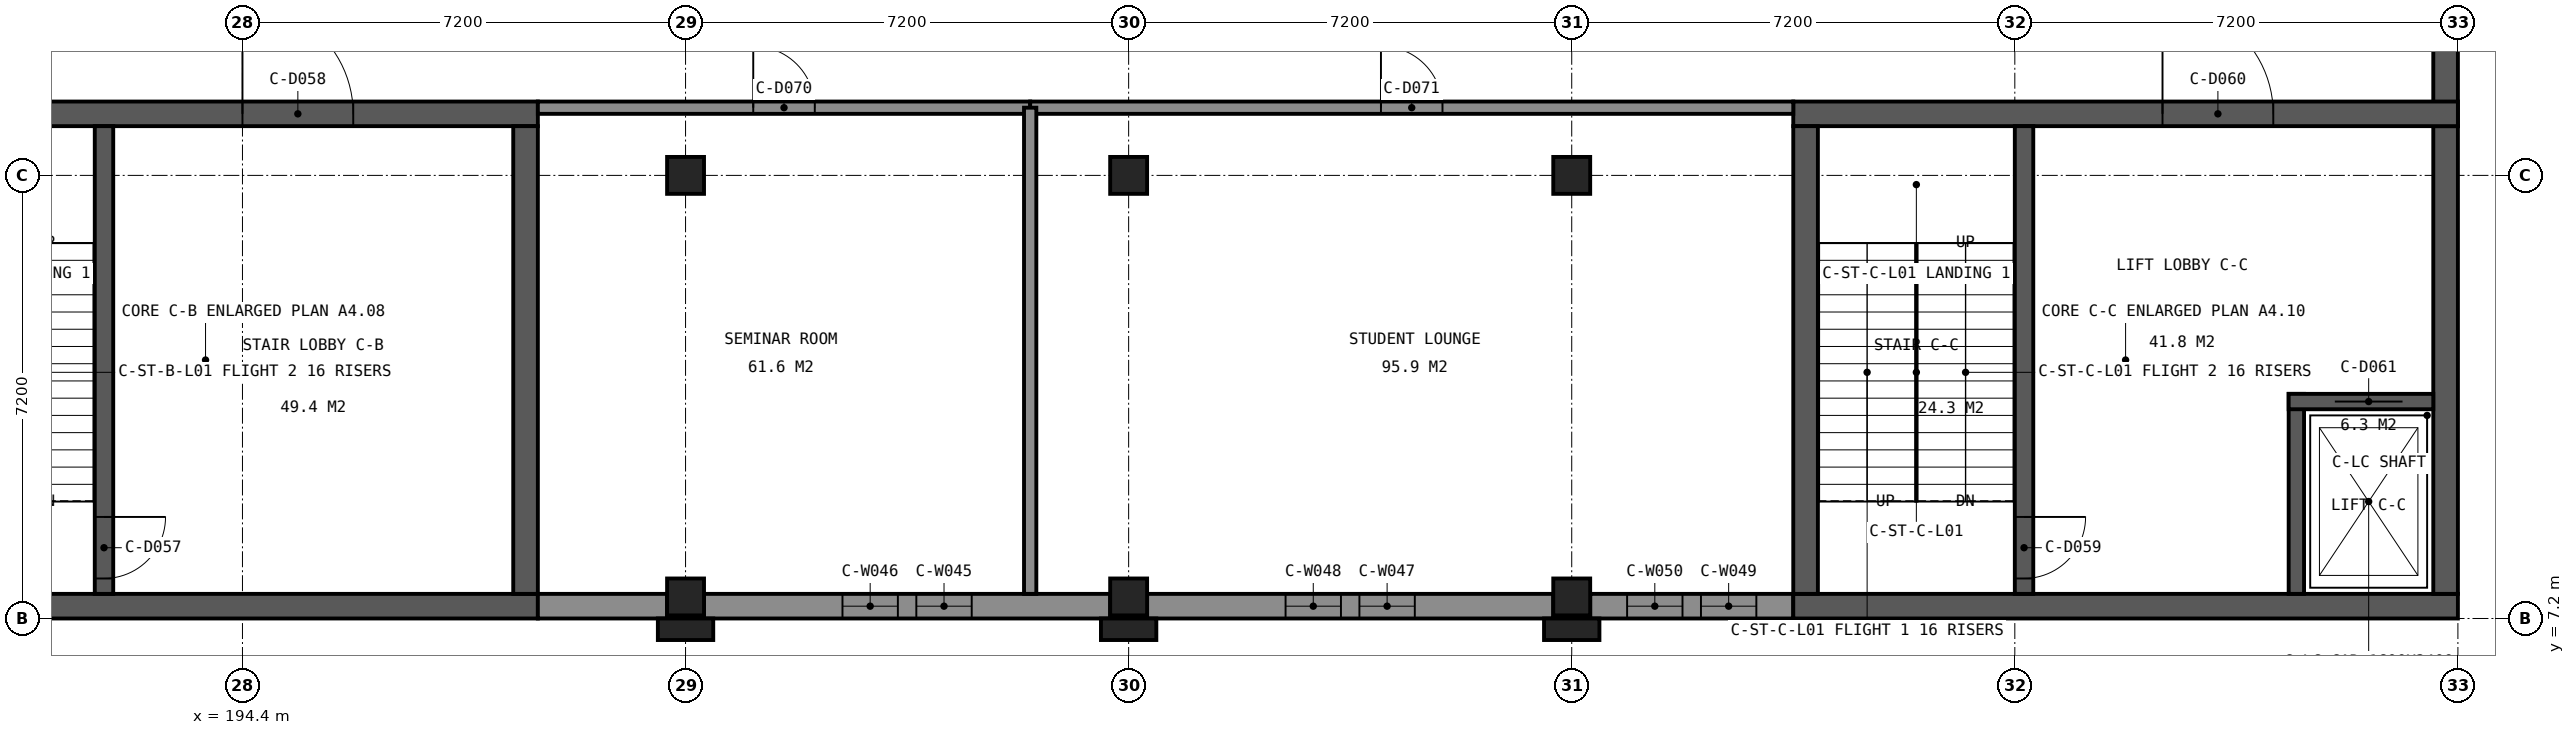
"""IFC4 building model, lengths in metres.
Left out: names, types, materials, properties, quantities, classifications, styles, units other than length and angle.
Written with IfcOpenShell. Run it as: python <this file> out.ifc"""

import sys

from ifc_helpers import new_model, si_unit, direction, frame, frame_2d, origin, origin_2d, place, context, subcontext, project, spatial, rectangle, extrude, element, fill, save


model = new_model("IFC4")
c1 = context("Model", 3, precision=1e-05, world=origin(), true_north=direction((0.0, 1.0)))
c2 = subcontext(c1, "Body", "Model", "MODEL_VIEW")
j1 = project(units=[si_unit("LENGTHUNIT", "METRE"), si_unit("PLANEANGLEUNIT", "RADIAN")], contexts=[c1])
p1 = place(None, origin())
s1 = spatial("IfcSite", under=j1, at=p1, CompositionType="ELEMENT")
p2 = place(p1, origin())
s2 = spatial("IfcBuilding", under=s1, at=p2, CompositionType="ELEMENT")
p3 = place(p2, frame((0.0, 0.0, 9.6)))
s3 = spatial("IfcBuildingStorey", under=s2, at=p3, CompositionType="ELEMENT", Elevation=9.6)
for number, where, z_axis, x_axis in (
    (1, (201.6, 14.4, 0.0), (0.0, 0.0, 1.0), (1.0, 0.0, 0.0)),
    (2, (208.8, 14.4, 0.0), (0.0, 0.0, 1.0), (1.0, 0.0, 0.0)),
    (3, (216.0, 14.4, 0.0), (0.0, 0.0, 1.0), (1.0, 0.0, 0.0)),
    (4, (201.6, 7.55, 0.0), (0.0, 0.0, 1.0), (1.0, 0.0, 0.0)),
    (5, (208.8, 7.55, 0.0), (0.0, 0.0, 1.0), (1.0, 0.0, 0.0)),
    (6, (216.0, 7.55, 0.0), (0.0, 0.0, 1.0), (1.0, 0.0, 0.0)),
):
    element("IfcColumn", number, at=place(p3, frame(where, z_axis=z_axis, x_axis=x_axis)), inside=s3, PredefinedType="COLUMN", context=c2, shape_type="SweptSolid", body=[
        extrude(rectangle(XDim=0.6, YDim=0.6, at=origin_2d()), origin(), (0.0, 0.0, 1.0), 4.8),
    ])
p4 = place(p3, frame((199.2, 7.4, 0.0), z_axis=(0.0, 0.0, 1.0), x_axis=(-1.0, 0.0, 0.0)))
e7 = element("IfcWall", 7, at=p4, inside=s3, PredefinedType="SHEAR", context=c2, shape_type="SweptSolid", body=[
    extrude(rectangle(XDim=10.8, YDim=0.4, at=frame_2d((5.4, 0.0))), origin(), (0.0, 0.0, 1.0), 4.55),
])
p5 = place(p3, frame((201.3, 7.4, 0.0), z_axis=(0.0, 0.0, 1.0), x_axis=(-1.0, 0.0, 0.0)))
e8 = element("IfcWall", 8, at=p5, inside=s3, PredefinedType="SOLIDWALL", context=c2, shape_type="SweptSolid", body=[
    extrude(rectangle(XDim=2.1, YDim=0.4, at=frame_2d((1.05, 0.0))), origin(), (0.0, 0.0, 1.0), 3.95),
])
p6 = place(p3, frame((208.5, 7.4, 0.0), z_axis=(0.0, 0.0, 1.0), x_axis=(-1.0, 0.0, 0.0)))
e9 = element("IfcWall", 9, at=p6, inside=s3, PredefinedType="SOLIDWALL", context=c2, shape_type="SweptSolid", body=[
    extrude(rectangle(XDim=6.6, YDim=0.4, at=frame_2d((3.3, 0.0))), origin(), (0.0, 0.0, 1.0), 3.95),
])
p7 = place(p6, frame((2.25, 0.0, 0.9)))
e10 = element("IfcOpeningElement", 10, at=p7, cuts=e9, PredefinedType="OPENING", context=c2, shape_type="SweptSolid", body=[
    extrude(rectangle(XDim=0.9, YDim=2.7, at=frame_2d((0.45, 1.35))), frame((0.0, 0.21, 0.0), z_axis=(0.0, -1.0, 0.0), x_axis=(1.0, 0.0, 0.0)), (0.0, 0.0, 1.0), 0.42),
])
p8 = place(p6, frame((3.45, 0.0, 0.9)))
e11 = element("IfcOpeningElement", 11, at=p8, cuts=e9, PredefinedType="OPENING", context=c2, shape_type="SweptSolid", body=[
    extrude(rectangle(XDim=0.9, YDim=2.7, at=frame_2d((0.45, 1.35))), frame((0.0, 0.21, 0.0), z_axis=(0.0, -1.0, 0.0), x_axis=(1.0, 0.0, 0.0)), (0.0, 0.0, 1.0), 0.42),
])
p9 = place(p3, frame((215.7, 7.4, 0.0), z_axis=(0.0, 0.0, 1.0), x_axis=(-1.0, 0.0, 0.0)))
e12 = element("IfcWall", 12, at=p9, inside=s3, PredefinedType="SOLIDWALL", context=c2, shape_type="SweptSolid", body=[
    extrude(rectangle(XDim=6.6, YDim=0.4, at=frame_2d((3.3, 0.0))), origin(), (0.0, 0.0, 1.0), 3.95),
])
p10 = place(p9, frame((2.25, 0.0, 0.9)))
e13 = element("IfcOpeningElement", 13, at=p10, cuts=e12, PredefinedType="OPENING", context=c2, shape_type="SweptSolid", body=[
    extrude(rectangle(XDim=0.9, YDim=2.7, at=frame_2d((0.45, 1.35))), frame((0.0, 0.21, 0.0), z_axis=(0.0, -1.0, 0.0), x_axis=(1.0, 0.0, 0.0)), (0.0, 0.0, 1.0), 0.42),
])
p11 = place(p9, frame((3.45, 0.0, 0.9)))
e14 = element("IfcOpeningElement", 14, at=p11, cuts=e12, PredefinedType="OPENING", context=c2, shape_type="SweptSolid", body=[
    extrude(rectangle(XDim=0.9, YDim=2.7, at=frame_2d((0.45, 1.35))), frame((0.0, 0.21, 0.0), z_axis=(0.0, -1.0, 0.0), x_axis=(1.0, 0.0, 0.0)), (0.0, 0.0, 1.0), 0.42),
])
p12 = place(p3, frame((219.6, 7.4, 0.0), z_axis=(0.0, 0.0, 1.0), x_axis=(-1.0, 0.0, 0.0)))
e15 = element("IfcWall", 15, at=p12, inside=s3, PredefinedType="SOLIDWALL", context=c2, shape_type="SweptSolid", body=[
    extrude(rectangle(XDim=3.3, YDim=0.4, at=frame_2d((1.65, 0.0))), origin(), (0.0, 0.0, 1.0), 3.95),
])
p13 = place(p12, frame((0.6, 0.0, 0.9)))
e16 = element("IfcOpeningElement", 16, at=p13, cuts=e15, PredefinedType="OPENING", context=c2, shape_type="SweptSolid", body=[
    extrude(rectangle(XDim=0.9, YDim=2.7, at=frame_2d((0.45, 1.35))), frame((0.0, 0.21, 0.0), z_axis=(0.0, -1.0, 0.0), x_axis=(1.0, 0.0, 0.0)), (0.0, 0.0, 1.0), 0.42),
])
p14 = place(p12, frame((1.8, 0.0, 0.9)))
e17 = element("IfcOpeningElement", 17, at=p14, cuts=e15, PredefinedType="OPENING", context=c2, shape_type="SweptSolid", body=[
    extrude(rectangle(XDim=0.9, YDim=2.7, at=frame_2d((0.45, 1.35))), frame((0.0, 0.21, 0.0), z_axis=(0.0, -1.0, 0.0), x_axis=(1.0, 0.0, 0.0)), (0.0, 0.0, 1.0), 0.42),
])
p15 = place(p3, frame((230.4, 7.4, 0.0), z_axis=(0.0, 0.0, 1.0), x_axis=(-1.0, 0.0, 0.0)))
e18 = element("IfcWall", 18, at=p15, inside=s3, PredefinedType="SHEAR", context=c2, shape_type="SweptSolid", body=[
    extrude(rectangle(XDim=10.8, YDim=0.4, at=frame_2d((5.4, 0.0))), origin(), (0.0, 0.0, 1.0), 4.55),
])
p16 = place(p3, frame((230.2, 21.3, 0.0), z_axis=(0.0, 0.0, 1.0), x_axis=(0.0, -1.0, 0.0)))
e19 = element("IfcWall", 19, at=p16, inside=s3, PredefinedType="SHEAR", context=c2, shape_type="SweptSolid", body=[
    extrude(rectangle(XDim=6.1, YDim=0.4, at=frame_2d((3.05, 0.0))), origin(), (0.0, 0.0, 1.0), 3.95),
])
p17 = place(p16, frame((3.2, 0.0, 0.9)))
e20 = element("IfcOpeningElement", 20, at=p17, cuts=e19, PredefinedType="OPENING", context=c2, shape_type="SweptSolid", body=[
    extrude(rectangle(XDim=0.9, YDim=2.7, at=frame_2d((0.45, 1.35))), frame((0.0, 0.21, 0.0), z_axis=(0.0, -1.0, 0.0), x_axis=(1.0, 0.0, 0.0)), (0.0, 0.0, 1.0), 0.42),
])
p18 = place(p3, frame((230.2, 15.2, 0.0), z_axis=(0.0, 0.0, 1.0), x_axis=(0.0, -1.0, 0.0)))
e21 = element("IfcWall", 21, at=p18, inside=s3, PredefinedType="SHEAR", context=c2, shape_type="SweptSolid", body=[
    extrude(rectangle(XDim=7.6, YDim=0.4, at=frame_2d((3.8, 0.0))), origin(), (0.0, 0.0, 1.0), 4.55),
])
p19 = place(p3, frame((188.4, 15.4, 0.0), z_axis=(0.0, 0.0, 1.0), x_axis=(1.0, 0.0, 0.0)))
e22 = element("IfcWall", 22, at=p19, inside=s3, PredefinedType="SHEAR", context=c2, shape_type="SweptSolid", body=[
    extrude(rectangle(XDim=10.8, YDim=0.4, at=frame_2d((5.4, 0.0))), origin(), (0.0, 0.0, 1.0), 4.55),
])
p20 = place(p19, frame((6.0, 0.0, 0.0)))
e23 = element("IfcOpeningElement", 23, at=p20, cuts=e22, PredefinedType="OPENING", context=c2, shape_type="SweptSolid", body=[
    extrude(rectangle(XDim=1.8, YDim=2.1, at=frame_2d((0.9, 1.05))), frame((0.0, 0.21, 0.0), z_axis=(0.0, -1.0, 0.0), x_axis=(1.0, 0.0, 0.0)), (0.0, 0.0, 1.0), 0.42),
])
p21 = place(p3, frame((199.0, 15.2, 0.0), z_axis=(0.0, 0.0, 1.0), x_axis=(0.0, -1.0, 0.0)))
e24 = element("IfcWall", 24, at=p21, inside=s3, PredefinedType="SHEAR", context=c2, shape_type="SweptSolid", body=[
    extrude(rectangle(XDim=7.6, YDim=0.4, at=frame_2d((3.8, 0.0))), origin(), (0.0, 0.0, 1.0), 4.55),
])
p22 = place(p3, frame((192.15, 15.2, 0.0), z_axis=(0.0, 0.0, 1.0), x_axis=(0.0, -1.0, 0.0)))
e25 = element("IfcWall", 25, at=p22, inside=s3, PredefinedType="SHEAR", context=c2, shape_type="SweptSolid", body=[
    extrude(rectangle(XDim=7.6, YDim=0.3, at=frame_2d((3.8, 0.0))), origin(), (0.0, 0.0, 1.0), 4.55),
])
p23 = place(p22, frame((6.35, 0.0, 0.0)))
e26 = element("IfcOpeningElement", 26, at=p23, cuts=e25, PredefinedType="OPENING", context=c2, shape_type="SweptSolid", body=[
    extrude(rectangle(XDim=1.0, YDim=2.1, at=frame_2d((0.5, 1.05))), frame((0.0, 0.16, 0.0), z_axis=(0.0, -1.0, 0.0), x_axis=(1.0, 0.0, 0.0)), (0.0, 0.0, 1.0), 0.32),
])
p24 = place(p3, frame((219.6, 15.4, 0.0), z_axis=(0.0, 0.0, 1.0), x_axis=(1.0, 0.0, 0.0)))
e27 = element("IfcWall", 27, at=p24, inside=s3, PredefinedType="SHEAR", context=c2, shape_type="SweptSolid", body=[
    extrude(rectangle(XDim=10.8, YDim=0.4, at=frame_2d((5.4, 0.0))), origin(), (0.0, 0.0, 1.0), 4.55),
])
p25 = place(p24, frame((6.0, 0.0, 0.0)))
e28 = element("IfcOpeningElement", 28, at=p25, cuts=e27, PredefinedType="OPENING", context=c2, shape_type="SweptSolid", body=[
    extrude(rectangle(XDim=1.8, YDim=2.1, at=frame_2d((0.9, 1.05))), frame((0.0, 0.21, 0.0), z_axis=(0.0, -1.0, 0.0), x_axis=(1.0, 0.0, 0.0)), (0.0, 0.0, 1.0), 0.42),
])
p26 = place(p3, frame((219.8, 15.2, 0.0), z_axis=(0.0, 0.0, 1.0), x_axis=(0.0, -1.0, 0.0)))
e29 = element("IfcWall", 29, at=p26, inside=s3, PredefinedType="SHEAR", context=c2, shape_type="SweptSolid", body=[
    extrude(rectangle(XDim=7.6, YDim=0.4, at=frame_2d((3.8, 0.0))), origin(), (0.0, 0.0, 1.0), 4.55),
])
p27 = place(p3, frame((223.35, 15.2, 0.0), z_axis=(0.0, 0.0, 1.0), x_axis=(0.0, -1.0, 0.0)))
e30 = element("IfcWall", 30, at=p27, inside=s3, PredefinedType="SHEAR", context=c2, shape_type="SweptSolid", body=[
    extrude(rectangle(XDim=7.6, YDim=0.3, at=frame_2d((3.8, 0.0))), origin(), (0.0, 0.0, 1.0), 4.55),
])
p28 = place(p27, frame((6.35, 0.0, 0.0)))
e31 = element("IfcOpeningElement", 31, at=p28, cuts=e30, PredefinedType="OPENING", context=c2, shape_type="SweptSolid", body=[
    extrude(rectangle(XDim=1.0, YDim=2.1, at=frame_2d((0.5, 1.05))), frame((0.0, 0.16, 0.0), z_axis=(0.0, -1.0, 0.0), x_axis=(1.0, 0.0, 0.0)), (0.0, 0.0, 1.0), 0.32),
])
p29 = place(p3, frame((227.775, 10.85, 0.0), z_axis=(0.0, 0.0, 1.0), x_axis=(0.0, -1.0, 0.0)))
e32 = element("IfcWall", 32, at=p29, inside=s3, PredefinedType="SHEAR", context=c2, shape_type="SweptSolid", body=[
    extrude(rectangle(XDim=3.25, YDim=0.25, at=frame_2d((1.625, 0.0))), origin(), (0.0, 0.0, 1.0), 4.55),
])
p30 = place(p3, frame((227.65, 10.725, 0.0), z_axis=(0.0, 0.0, 1.0), x_axis=(1.0, 0.0, 0.0)))
e33 = element("IfcWall", 33, at=p30, inside=s3, PredefinedType="SHEAR", context=c2, shape_type="SweptSolid", body=[
    extrude(rectangle(XDim=2.35, YDim=0.25, at=frame_2d((1.175, 0.0))), origin(), (0.0, 0.0, 1.0), 4.55),
])
p31 = place(p30, frame((0.75, 0.0, 0.0)))
e34 = element("IfcOpeningElement", 34, at=p31, cuts=e33, PredefinedType="OPENING", context=c2, shape_type="SweptSolid", body=[
    extrude(rectangle(XDim=1.1, YDim=2.1, at=frame_2d((0.55, 1.05))), frame((0.0, 0.135, 0.0), z_axis=(0.0, -1.0, 0.0), x_axis=(1.0, 0.0, 0.0)), (0.0, 0.0, 1.0), 0.27),
])
for number, where, z_axis, x_axis in (
    (35, (201.6, 7.025, 0.0), (0.0, 0.0, 1.0), (1.0, 0.0, 0.0)),
    (36, (208.8, 7.025, 0.0), (0.0, 0.0, 1.0), (1.0, 0.0, 0.0)),
    (37, (216.0, 7.025, 0.0), (0.0, 0.0, 1.0), (1.0, 0.0, 0.0)),
):
    element("IfcColumn", number, at=place(p3, frame(where, z_axis=z_axis, x_axis=x_axis)), inside=s3, PredefinedType="PILASTER", context=c2, shape_type="SweptSolid", body=[
        extrude(rectangle(XDim=0.9, YDim=0.35, at=origin_2d()), origin(), (0.0, 0.0, 1.0), 4.8),
    ])
p32 = place(p3, frame((199.2, 15.5, 0.0), z_axis=(0.0, 0.0, 1.0), x_axis=(1.0, 0.0, 0.0)))
e38 = element("IfcWall", 38, at=p32, inside=s3, PredefinedType="PARTITIONING", context=c2, shape_type="SweptSolid", body=[
    extrude(rectangle(XDim=8.0, YDim=0.2, at=frame_2d((4.0, 0.0))), origin(), (0.0, 0.0, 1.0), 3.95),
])
p33 = place(p32, frame((3.5, 0.0, 0.0)))
e39 = element("IfcOpeningElement", 39, at=p33, cuts=e38, PredefinedType="OPENING", context=c2, shape_type="SweptSolid", body=[
    extrude(rectangle(XDim=1.0, YDim=2.1, at=frame_2d((0.5, 1.05))), frame((0.0, 0.11, 0.0), z_axis=(0.0, -1.0, 0.0), x_axis=(1.0, 0.0, 0.0)), (0.0, 0.0, 1.0), 0.22),
])
p34 = place(p3, frame((207.2, 15.5, 0.0), z_axis=(0.0, 0.0, 1.0), x_axis=(1.0, 0.0, 0.0)))
e40 = element("IfcWall", 40, at=p34, inside=s3, PredefinedType="PARTITIONING", context=c2, shape_type="SweptSolid", body=[
    extrude(rectangle(XDim=12.4, YDim=0.2, at=frame_2d((6.2, 0.0))), origin(), (0.0, 0.0, 1.0), 3.95),
])
p35 = place(p34, frame((5.7, 0.0, 0.0)))
e41 = element("IfcOpeningElement", 41, at=p35, cuts=e40, PredefinedType="OPENING", context=c2, shape_type="SweptSolid", body=[
    extrude(rectangle(XDim=1.0, YDim=2.1, at=frame_2d((0.5, 1.05))), frame((0.0, 0.11, 0.0), z_axis=(0.0, -1.0, 0.0), x_axis=(1.0, 0.0, 0.0)), (0.0, 0.0, 1.0), 0.22),
])
p36 = place(p3, frame((207.2, 15.5, 0.0), z_axis=(0.0, 0.0, 1.0), x_axis=(0.0, -1.0, 0.0)))
e42 = element("IfcWall", 42, at=p36, inside=s3, PredefinedType="PARTITIONING", context=c2, shape_type="SweptSolid", body=[
    extrude(rectangle(XDim=7.9, YDim=0.2, at=frame_2d((3.95, 0.0))), origin(), (0.0, 0.0, 1.0), 3.95),
])
p37 = place(p7, origin())
e43 = element("IfcWindow", 43, at=p37, inside=s3, PartitioningType="SINGLE_PANEL", PredefinedType="WINDOW", context=c2, shape_type="SweptSolid", body=[
    extrude(rectangle(XDim=0.9, YDim=2.7, at=frame_2d((0.45, 1.35))), frame((0.0, -0.09, 0.0), z_axis=(0.0, -1.0, 0.0), x_axis=(1.0, 0.0, 0.0)), (0.0, 0.0, 1.0), 0.06),
])
fill(e10, e43)
p38 = place(p8, origin())
e44 = element("IfcWindow", 44, at=p38, inside=s3, PartitioningType="SINGLE_PANEL", PredefinedType="WINDOW", context=c2, shape_type="SweptSolid", body=[
    extrude(rectangle(XDim=0.9, YDim=2.7, at=frame_2d((0.45, 1.35))), frame((0.0, -0.09, 0.0), z_axis=(0.0, -1.0, 0.0), x_axis=(1.0, 0.0, 0.0)), (0.0, 0.0, 1.0), 0.06),
])
fill(e11, e44)
p39 = place(p10, origin())
e45 = element("IfcWindow", 45, at=p39, inside=s3, PartitioningType="SINGLE_PANEL", PredefinedType="WINDOW", context=c2, shape_type="SweptSolid", body=[
    extrude(rectangle(XDim=0.9, YDim=2.7, at=frame_2d((0.45, 1.35))), frame((0.0, -0.09, 0.0), z_axis=(0.0, -1.0, 0.0), x_axis=(1.0, 0.0, 0.0)), (0.0, 0.0, 1.0), 0.06),
])
fill(e13, e45)
p40 = place(p11, origin())
e46 = element("IfcWindow", 46, at=p40, inside=s3, PartitioningType="SINGLE_PANEL", PredefinedType="WINDOW", context=c2, shape_type="SweptSolid", body=[
    extrude(rectangle(XDim=0.9, YDim=2.7, at=frame_2d((0.45, 1.35))), frame((0.0, -0.09, 0.0), z_axis=(0.0, -1.0, 0.0), x_axis=(1.0, 0.0, 0.0)), (0.0, 0.0, 1.0), 0.06),
])
fill(e14, e46)
p41 = place(p13, origin())
e47 = element("IfcWindow", 47, at=p41, inside=s3, PartitioningType="SINGLE_PANEL", PredefinedType="WINDOW", context=c2, shape_type="SweptSolid", body=[
    extrude(rectangle(XDim=0.9, YDim=2.7, at=frame_2d((0.45, 1.35))), frame((0.0, -0.09, 0.0), z_axis=(0.0, -1.0, 0.0), x_axis=(1.0, 0.0, 0.0)), (0.0, 0.0, 1.0), 0.06),
])
fill(e16, e47)
p42 = place(p14, origin())
e48 = element("IfcWindow", 48, at=p42, inside=s3, PartitioningType="SINGLE_PANEL", PredefinedType="WINDOW", context=c2, shape_type="SweptSolid", body=[
    extrude(rectangle(XDim=0.9, YDim=2.7, at=frame_2d((0.45, 1.35))), frame((0.0, -0.09, 0.0), z_axis=(0.0, -1.0, 0.0), x_axis=(1.0, 0.0, 0.0)), (0.0, 0.0, 1.0), 0.06),
])
fill(e17, e48)
p43 = place(p23, origin())
e49 = element("IfcDoor", 49, at=p43, inside=s3, OperationType="NOTDEFINED", PredefinedType="DOOR", context=c2, shape_type="SweptSolid", body=[
    extrude(rectangle(XDim=1.0, YDim=2.1, at=frame_2d((0.5, 1.05))), frame((0.0, 0.025, 0.0), z_axis=(0.0, -1.0, 0.0), x_axis=(1.0, 0.0, 0.0)), (0.0, 0.0, 1.0), 0.05),
])
fill(e26, e49)
p44 = place(p20, origin())
e50 = element("IfcDoor", 50, at=p44, inside=s3, OperationType="NOTDEFINED", PredefinedType="DOOR", context=c2, shape_type="SweptSolid", body=[
    extrude(rectangle(XDim=1.8, YDim=2.1, at=frame_2d((0.9, 1.05))), frame((0.0, 0.025, 0.0), z_axis=(0.0, -1.0, 0.0), x_axis=(1.0, 0.0, 0.0)), (0.0, 0.0, 1.0), 0.05),
])
fill(e23, e50)
p45 = place(p28, origin())
e51 = element("IfcDoor", 51, at=p45, inside=s3, OperationType="NOTDEFINED", PredefinedType="DOOR", context=c2, shape_type="SweptSolid", body=[
    extrude(rectangle(XDim=1.0, YDim=2.1, at=frame_2d((0.5, 1.05))), frame((0.0, 0.025, 0.0), z_axis=(0.0, -1.0, 0.0), x_axis=(1.0, 0.0, 0.0)), (0.0, 0.0, 1.0), 0.05),
])
fill(e31, e51)
p46 = place(p25, origin())
e52 = element("IfcDoor", 52, at=p46, inside=s3, OperationType="NOTDEFINED", PredefinedType="DOOR", context=c2, shape_type="SweptSolid", body=[
    extrude(rectangle(XDim=1.8, YDim=2.1, at=frame_2d((0.9, 1.05))), frame((0.0, 0.025, 0.0), z_axis=(0.0, -1.0, 0.0), x_axis=(1.0, 0.0, 0.0)), (0.0, 0.0, 1.0), 0.05),
])
fill(e28, e52)
p47 = place(p31, origin())
e53 = element("IfcDoor", 53, at=p47, inside=s3, OperationType="SLIDING_TO_LEFT", PredefinedType="DOOR", context=c2, shape_type="SweptSolid", body=[
    extrude(rectangle(XDim=1.1, YDim=2.1, at=frame_2d((0.55, 1.05))), frame((0.0, 0.025, 0.0), z_axis=(0.0, -1.0, 0.0), x_axis=(1.0, 0.0, 0.0)), (0.0, 0.0, 1.0), 0.05),
])
fill(e34, e53)
p48 = place(p33, origin())
e54 = element("IfcDoor", 54, at=p48, inside=s3, OperationType="NOTDEFINED", PredefinedType="DOOR", context=c2, shape_type="SweptSolid", body=[
    extrude(rectangle(XDim=1.0, YDim=2.1, at=frame_2d((0.5, 1.05))), frame((0.0, 0.025, 0.0), z_axis=(0.0, -1.0, 0.0), x_axis=(1.0, 0.0, 0.0)), (0.0, 0.0, 1.0), 0.05),
])
fill(e39, e54)
p49 = place(p35, origin())
e55 = element("IfcDoor", 55, at=p49, inside=s3, OperationType="NOTDEFINED", PredefinedType="DOOR", context=c2, shape_type="SweptSolid", body=[
    extrude(rectangle(XDim=1.0, YDim=2.1, at=frame_2d((0.5, 1.05))), frame((0.0, 0.025, 0.0), z_axis=(0.0, -1.0, 0.0), x_axis=(1.0, 0.0, 0.0)), (0.0, 0.0, 1.0), 0.05),
])
fill(e41, e55)
save(model, sys.argv[1])
